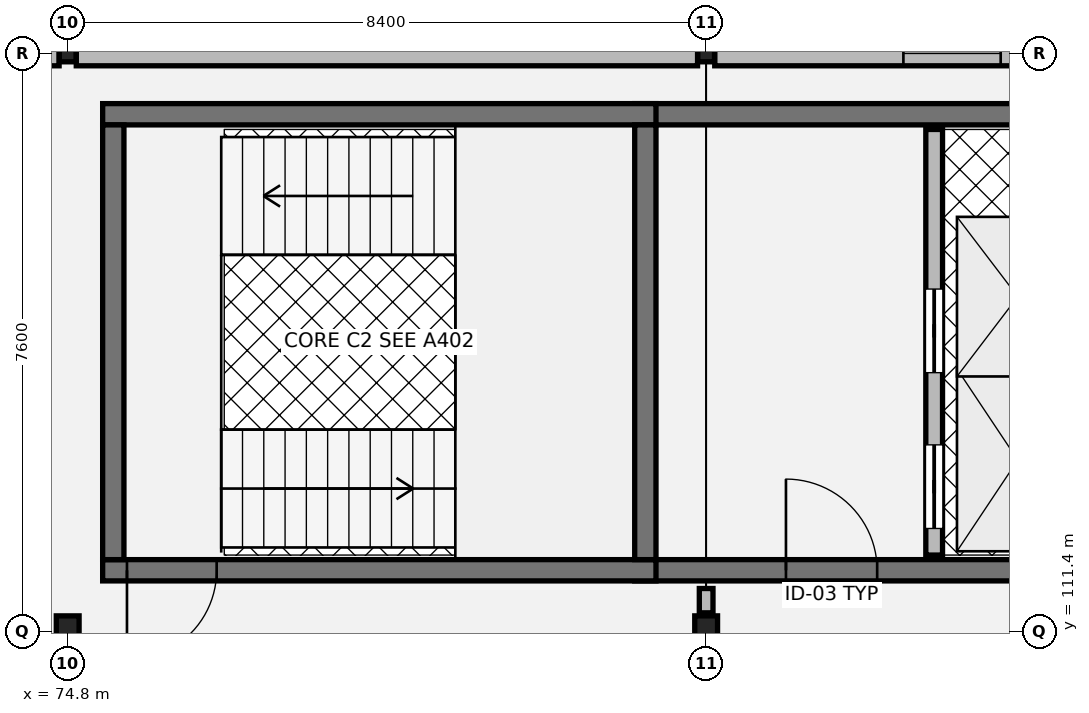
"""IFC4 building model, lengths in metres.
Left out: names, types, materials, properties, quantities, classifications, styles, units other than length and angle.
Written with IfcOpenShell. Run it as: python <this file> out.ifc"""

import sys

from ifc_helpers import new_model, si_unit, direction, frame, frame_2d, origin, origin_2d, place, context, subcontext, project, spatial, rectangle, hollow_rectangle, i_section, extrude, element, fill, save


model = new_model("IFC4")
c1 = context("Model", 3, precision=1e-05, world=origin(), true_north=direction((0.0, 1.0)))
c2 = subcontext(c1, "Body", "Model", "MODEL_VIEW")
j1 = project(units=[si_unit("LENGTHUNIT", "METRE"), si_unit("PLANEANGLEUNIT", "RADIAN")], contexts=[c1])
p1 = place(None, origin())
s1 = spatial("IfcSite", under=j1, at=p1, CompositionType="ELEMENT")
p2 = place(p1, origin())
s2 = spatial("IfcBuilding", under=s1, at=p2, CompositionType="ELEMENT")
p3 = place(p2, frame((0.0, 0.0, 13.26)))
s3 = spatial("IfcBuildingStorey", under=s2, at=p3, CompositionType="ELEMENT", Elevation=13.26)
p4 = place(p3, frame((74.8, 111.4, 0.0), z_axis=(0.0, 0.0, 1.0), x_axis=(1.0, 0.0, 0.0)))
e1 = element("IfcColumn", 1, at=p4, inside=s3, PredefinedType="COLUMN", context=c2, shape_type="SweptSolid", body=[
    extrude(i_section(OverallWidth=0.3, OverallDepth=0.4, WebThickness=0.013, FlangeThickness=0.024, at=origin_2d()), origin(), (0.0, 0.0, 1.0), 4.055),
])
p5 = place(p3, frame((74.8, 119.0, 0.0), z_axis=(0.0, 0.0, 1.0), x_axis=(1.0, 0.0, 0.0)))
e2 = element("IfcColumn", 2, at=p5, inside=s3, PredefinedType="COLUMN", context=c2, shape_type="SweptSolid", body=[
    extrude(hollow_rectangle(XDim=0.22, YDim=0.22, WallThickness=0.01, at=origin_2d()), origin(), (0.0, 0.0, 1.0), 4.055),
])
p6 = place(p3, frame((83.2, 111.4, 0.0), z_axis=(0.0, 0.0, 1.0), x_axis=(1.0, 0.0, 0.0)))
e3 = element("IfcColumn", 3, at=p6, inside=s3, PredefinedType="COLUMN", context=c2, shape_type="SweptSolid", body=[
    extrude(i_section(OverallWidth=0.3, OverallDepth=0.4, WebThickness=0.013, FlangeThickness=0.024, at=origin_2d()), origin(), (0.0, 0.0, 1.0), 4.055),
])
p7 = place(p3, frame((83.2, 119.0, 0.0), z_axis=(0.0, 0.0, 1.0), x_axis=(1.0, 0.0, 0.0)))
e4 = element("IfcColumn", 4, at=p7, inside=s3, PredefinedType="COLUMN", context=c2, shape_type="SweptSolid", body=[
    extrude(hollow_rectangle(XDim=0.22, YDim=0.22, WallThickness=0.01, at=origin_2d()), origin(), (0.0, 0.0, 1.0), 4.055),
])
p8 = place(p3, frame((91.487, 119.0, 0.0), z_axis=(0.0, 0.0, 1.0), x_axis=(-1.0, 0.0, 0.0)))
e5 = element("IfcWall", 5, at=p8, inside=s3, PredefinedType="SOLIDWALL", context=c2, shape_type="SweptSolid", body=[
    extrude(rectangle(XDim=8.174, YDim=0.325, at=frame_2d((4.087, 0.0))), origin(), (0.0, 0.0, 1.0), 3.48),
])
p9 = place(p8, frame((2.482, 0.0, 0.8)))
e6 = element("IfcOpeningElement", 6, at=p9, cuts=e5, PredefinedType="OPENING", context=c2, shape_type="SweptSolid", body=[
    extrude(rectangle(XDim=1.28, YDim=2.08, at=frame_2d((0.64, 1.04))), frame((0.0, 0.172, 0.0), z_axis=(0.0, -1.0, 0.0), x_axis=(1.0, 0.0, 0.0)), (0.0, 0.0, 1.0), 0.345),
])
p10 = place(p8, frame((4.412, 0.0, 0.8)))
e7 = element("IfcOpeningElement", 7, at=p10, cuts=e5, PredefinedType="OPENING", context=c2, shape_type="SweptSolid", body=[
    extrude(rectangle(XDim=1.28, YDim=2.08, at=frame_2d((0.64, 1.04))), frame((0.0, 0.172, 0.0), z_axis=(0.0, -1.0, 0.0), x_axis=(1.0, 0.0, 0.0)), (0.0, 0.0, 1.0), 0.345),
])
p11 = place(p3, frame((83.087, 119.0, 0.0), z_axis=(0.0, 0.0, 1.0), x_axis=(-1.0, 0.0, 0.0)))
e8 = element("IfcWall", 8, at=p11, inside=s3, PredefinedType="SOLIDWALL", context=c2, shape_type="SweptSolid", body=[
    extrude(rectangle(XDim=8.174, YDim=0.325, at=frame_2d((4.087, 0.0))), origin(), (0.0, 0.0, 1.0), 3.48),
])
p12 = place(p3, frame((74.687, 119.0, 0.0), z_axis=(0.0, 0.0, 1.0), x_axis=(-1.0, 0.0, 0.0)))
e9 = element("IfcWall", 9, at=p12, inside=s3, PredefinedType="SOLIDWALL", context=c2, shape_type="SweptSolid", body=[
    extrude(rectangle(XDim=8.174, YDim=0.325, at=frame_2d((4.087, 0.0))), origin(), (0.0, 0.0, 1.0), 3.48),
])
p13 = place(p12, frame((2.112, 0.0, 0.8)))
e10 = element("IfcOpeningElement", 10, at=p13, cuts=e9, PredefinedType="OPENING", context=c2, shape_type="SweptSolid", body=[
    extrude(rectangle(XDim=1.65, YDim=2.25, at=frame_2d((0.825, 1.125))), frame((0.0, 0.172, 0.0), z_axis=(0.0, -1.0, 0.0), x_axis=(1.0, 0.0, 0.0)), (0.0, 0.0, 1.0), 0.345),
])
p14 = place(p12, frame((4.412, 0.0, 0.8)))
e11 = element("IfcOpeningElement", 11, at=p14, cuts=e9, PredefinedType="OPENING", context=c2, shape_type="SweptSolid", body=[
    extrude(rectangle(XDim=1.65, YDim=2.25, at=frame_2d((0.825, 1.125))), frame((0.0, 0.172, 0.0), z_axis=(0.0, -1.0, 0.0), x_axis=(1.0, 0.0, 0.0)), (0.0, 0.0, 1.0), 0.345),
])
p15 = place(p3, frame((82.26, 112.2, 0.0), z_axis=(0.0, 0.0, 1.0), x_axis=(1.0, 0.0, 0.0)))
e12 = element("IfcWall", 12, at=p15, inside=s3, PredefinedType="SHEAR", context=c2, shape_type="SweptSolid", body=[
    extrude(rectangle(XDim=6.33, YDim=0.28, at=frame_2d((3.165, 0.0))), origin(), (0.0, 0.0, 1.0), 3.845),
])
p16 = place(p15, frame((1.99, 0.0, 0.0)))
e13 = element("IfcOpeningElement", 13, at=p16, cuts=e12, PredefinedType="OPENING", context=c2, shape_type="SweptSolid", body=[
    extrude(rectangle(XDim=1.2, YDim=2.16, at=frame_2d((0.6, 1.08))), frame((0.0, 0.15, 0.0), z_axis=(0.0, -1.0, 0.0), x_axis=(1.0, 0.0, 0.0)), (0.0, 0.0, 1.0), 0.3),
])
p17 = place(p3, frame((88.59, 118.2, 0.0), z_axis=(0.0, 0.0, 1.0), x_axis=(-1.0, 0.0, 0.0)))
e14 = element("IfcWall", 14, at=p17, inside=s3, PredefinedType="SHEAR", context=c2, shape_type="SweptSolid", body=[
    extrude(rectangle(XDim=6.33, YDim=0.28, at=frame_2d((3.165, 0.0))), origin(), (0.0, 0.0, 1.0), 3.845),
])
p18 = place(p3, frame((86.2, 112.4, 0.0), z_axis=(0.0, 0.0, 1.0), x_axis=(0.0, 1.0, 0.0)))
e15 = element("IfcWall", 15, at=p18, inside=s3, PredefinedType="SOLIDWALL", context=c2, shape_type="SweptSolid", body=[
    extrude(rectangle(XDim=5.6, YDim=0.22, at=frame_2d((2.8, 0.0))), origin(), (0.0, 0.0, 1.0), 3.845),
])
p19 = place(p18, frame((0.35, 0.0, 0.0)))
e16 = element("IfcOpeningElement", 16, at=p19, cuts=e15, PredefinedType="OPENING", context=c2, shape_type="SweptSolid", body=[
    extrude(rectangle(XDim=1.1, YDim=2.15, at=frame_2d((0.55, 1.075))), frame((0.0, 0.12, 0.0), z_axis=(0.0, -1.0, 0.0), x_axis=(1.0, 0.0, 0.0)), (0.0, 0.0, 1.0), 0.24),
])
p20 = place(p18, frame((2.4, 0.0, 0.0)))
e17 = element("IfcOpeningElement", 17, at=p20, cuts=e15, PredefinedType="OPENING", context=c2, shape_type="SweptSolid", body=[
    extrude(rectangle(XDim=1.1, YDim=2.15, at=frame_2d((0.55, 1.075))), frame((0.0, 0.12, 0.0), z_axis=(0.0, -1.0, 0.0), x_axis=(1.0, 0.0, 0.0)), (0.0, 0.0, 1.0), 0.24),
])
p21 = place(p3, frame((75.26, 112.2, 0.0), z_axis=(0.0, 0.0, 1.0), x_axis=(1.0, 0.0, 0.0)))
e18 = element("IfcWall", 18, at=p21, inside=s3, PredefinedType="SHEAR", context=c2, shape_type="SweptSolid", body=[
    extrude(rectangle(XDim=7.28, YDim=0.28, at=frame_2d((3.64, 0.0))), origin(), (0.0, 0.0, 1.0), 3.845),
])
p22 = place(p21, frame((0.32, 0.0, 0.0)))
e19 = element("IfcOpeningElement", 19, at=p22, cuts=e18, PredefinedType="OPENING", context=c2, shape_type="SweptSolid", body=[
    extrude(rectangle(XDim=1.18, YDim=2.18, at=frame_2d((0.59, 1.09))), frame((0.0, 0.15, 0.0), z_axis=(0.0, -1.0, 0.0), x_axis=(1.0, 0.0, 0.0)), (0.0, 0.0, 1.0), 0.3),
])
p23 = place(p3, frame((75.26, 118.2, 0.0), z_axis=(0.0, 0.0, 1.0), x_axis=(1.0, 0.0, 0.0)))
e20 = element("IfcWall", 20, at=p23, inside=s3, PredefinedType="SHEAR", context=c2, shape_type="SweptSolid", body=[
    extrude(rectangle(XDim=7.28, YDim=0.28, at=frame_2d((3.64, 0.0))), origin(), (0.0, 0.0, 1.0), 3.845),
])
for number, where, z_axis, x_axis in (
    (21, (75.4, 112.34, 0.0), (0.0, 0.0, 1.0), (0.0, 1.0, 0.0)),
    (22, (82.4, 112.34, 0.0), (0.0, 0.0, 1.0), (0.0, 1.0, 0.0)),
):
    element("IfcWall", number, at=place(p3, frame(where, z_axis=z_axis, x_axis=x_axis)), inside=s3, PredefinedType="SHEAR", context=c2, shape_type="SweptSolid", body=[
        extrude(rectangle(XDim=5.72, YDim=0.28, at=frame_2d((2.86, 0.0))), origin(), (0.0, 0.0, 1.0), 3.845),
    ])
p24 = place(p3, frame((83.2, 111.64, 0.0), z_axis=(0.0, 0.0, 1.0), x_axis=(0.0, 1.0, 0.0)))
e23 = element("IfcWall", 23, at=p24, inside=s3, PredefinedType="PARTITIONING", context=c2, shape_type="SweptSolid", body=[
    extrude(rectangle(XDim=0.32, YDim=0.18, at=frame_2d((0.16, 0.0))), origin(), (0.0, 0.0, 1.0), 3.18),
])
p25 = place(p10, origin())
e24 = element("IfcWindow", 24, at=p25, inside=s3, PartitioningType="SINGLE_PANEL", PredefinedType="WINDOW", context=c2, shape_type="SweptSolid", body=[
    extrude(rectangle(XDim=1.28, YDim=2.08, at=frame_2d((0.64, 1.04))), frame((0.0, 0.03, 0.0), z_axis=(0.0, -1.0, 0.0), x_axis=(1.0, 0.0, 0.0)), (0.0, 0.0, 1.0), 0.06),
])
fill(e7, e24)
p26 = place(p16, origin())
e25 = element("IfcDoor", 25, at=p26, inside=s3, OperationType="SINGLE_SWING_LEFT", PredefinedType="DOOR", context=c2, shape_type="SweptSolid", body=[
    extrude(rectangle(XDim=1.2, YDim=2.16, at=frame_2d((0.6, 1.08))), frame((0.0, 0.025, 0.0), z_axis=(0.0, -1.0, 0.0), x_axis=(1.0, 0.0, 0.0)), (0.0, 0.0, 1.0), 0.05),
])
fill(e13, e25)
p27 = place(p19, origin())
e26 = element("IfcDoor", 26, at=p27, inside=s3, OperationType="SLIDING_TO_LEFT", PredefinedType="DOOR", context=c2, shape_type="SweptSolid", body=[
    extrude(rectangle(XDim=1.1, YDim=2.15, at=frame_2d((0.55, 1.075))), frame((0.0, 0.025, 0.0), z_axis=(0.0, -1.0, 0.0), x_axis=(1.0, 0.0, 0.0)), (0.0, 0.0, 1.0), 0.05),
])
fill(e16, e26)
p28 = place(p20, origin())
e27 = element("IfcDoor", 27, at=p28, inside=s3, OperationType="SLIDING_TO_LEFT", PredefinedType="DOOR", context=c2, shape_type="SweptSolid", body=[
    extrude(rectangle(XDim=1.1, YDim=2.15, at=frame_2d((0.55, 1.075))), frame((0.0, 0.025, 0.0), z_axis=(0.0, -1.0, 0.0), x_axis=(1.0, 0.0, 0.0)), (0.0, 0.0, 1.0), 0.05),
])
fill(e17, e27)
p29 = place(p22, origin())
e28 = element("IfcDoor", 28, at=p29, inside=s3, OperationType="SINGLE_SWING_RIGHT", PredefinedType="DOOR", context=c2, shape_type="SweptSolid", body=[
    extrude(rectangle(XDim=1.18, YDim=2.18, at=frame_2d((0.59, 1.09))), frame((0.0, 0.025, 0.0), z_axis=(0.0, -1.0, 0.0), x_axis=(1.0, 0.0, 0.0)), (0.0, 0.0, 1.0), 0.05),
])
fill(e19, e28)
save(model, sys.argv[1])
